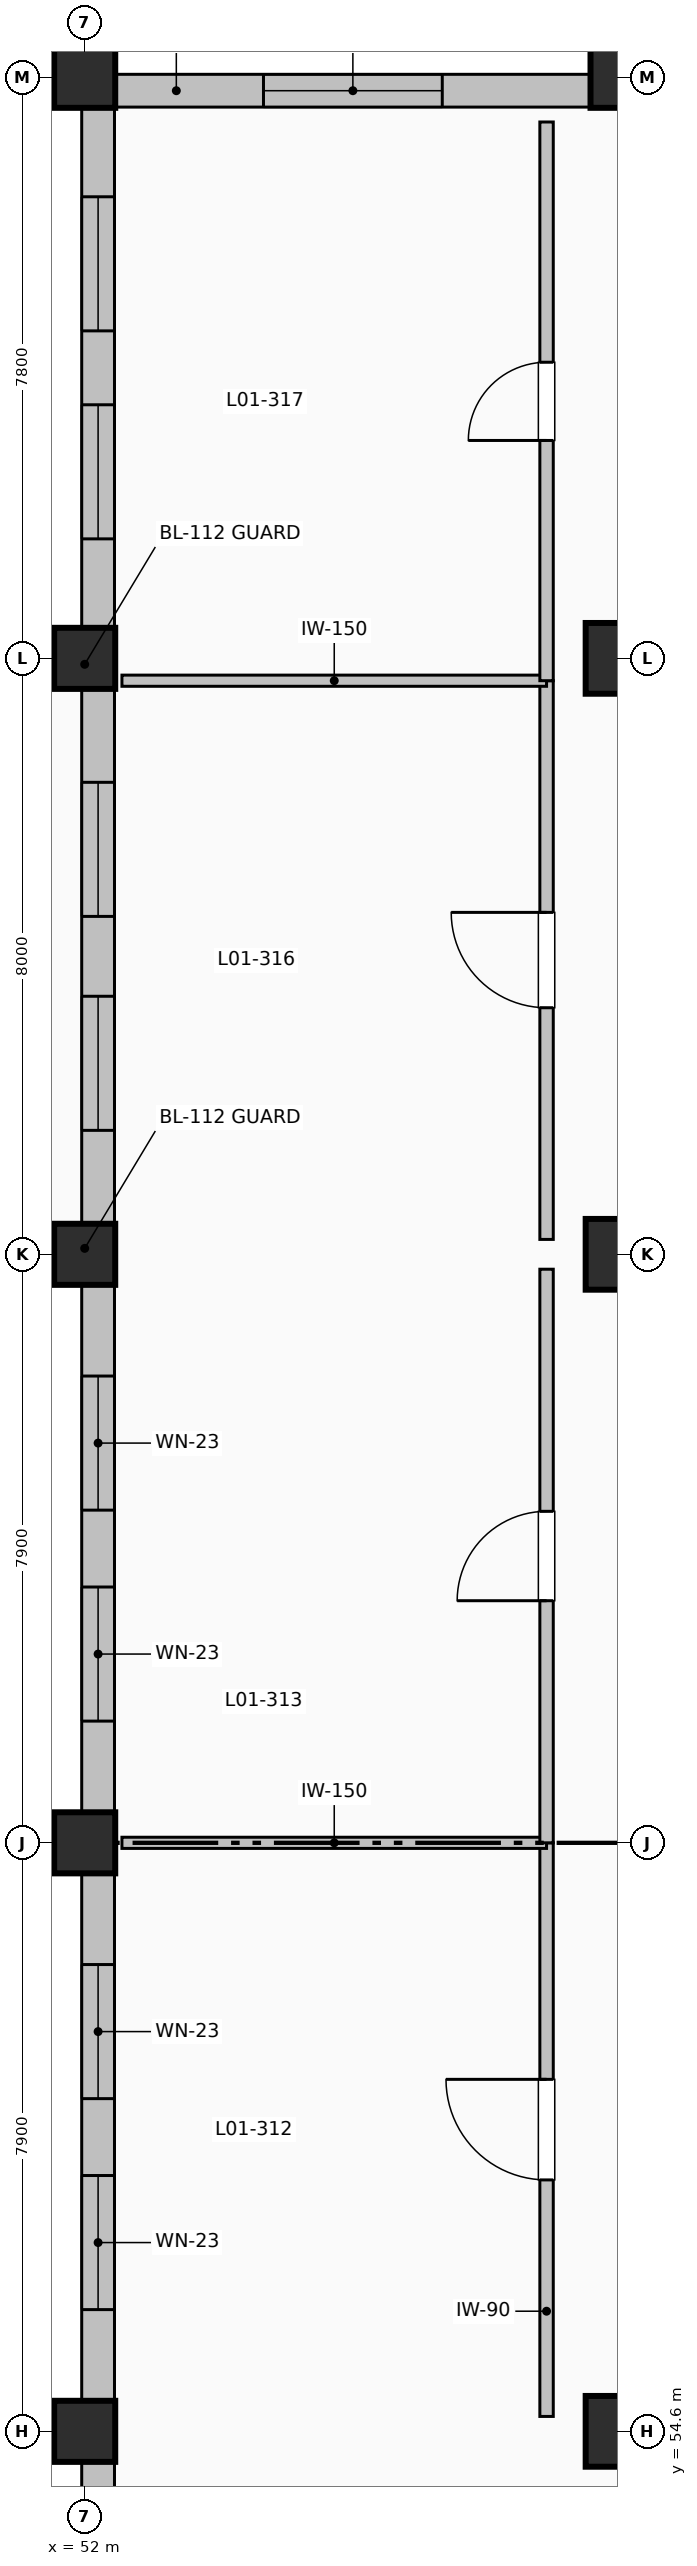
"""IFC4 building model, lengths in metres.
Left out: names, types, materials, properties, quantities, classifications, styles, units other than length and angle.
Written with IfcOpenShell. Run it as: python <this file> out.ifc"""

import sys

from ifc_helpers import new_model, si_unit, direction, frame, frame_2d, origin, origin_2d, place, context, subcontext, project, spatial, rectangle, extrude, element, fill, save


model = new_model("IFC4")
c1 = context("Model", 3, precision=1e-05, world=origin(), true_north=direction((0.0, 1.0)))
c2 = subcontext(c1, "Body", "Model", "MODEL_VIEW")
j1 = project(units=[si_unit("LENGTHUNIT", "METRE"), si_unit("PLANEANGLEUNIT", "RADIAN")], contexts=[c1])
p1 = place(None, origin())
s1 = spatial("IfcSite", under=j1, at=p1, CompositionType="ELEMENT")
p2 = place(p1, origin())
s2 = spatial("IfcBuilding", under=s1, at=p2, CompositionType="ELEMENT")
p3 = place(p2, frame((0.0, 0.0, 5.4)))
s3 = spatial("IfcBuildingStorey", under=s2, at=p3, CompositionType="ELEMENT", Elevation=5.4)
for number, where, z_axis, x_axis in (
    (1, (52.0, 54.6, 0.0), (0.0, 0.0, 1.0), (1.0, 0.0, 0.0)),
    (2, (52.0, 62.5, 0.0), (0.0, 0.0, 1.0), (1.0, 0.0, 0.0)),
    (3, (52.0, 70.4, 0.0), (0.0, 0.0, 1.0), (1.0, 0.0, 0.0)),
    (4, (52.0, 78.4, 0.0), (0.0, 0.0, 1.0), (1.0, 0.0, 0.0)),
    (5, (52.0, 86.2, 0.0), (0.0, 0.0, 1.0), (1.0, 0.0, 0.0)),
):
    element("IfcColumn", number, at=place(p3, frame(where, z_axis=z_axis, x_axis=x_axis)), inside=s3, PredefinedType="COLUMN", context=c2, shape_type="SweptSolid", body=[
        extrude(rectangle(XDim=0.82, YDim=0.82, at=origin_2d()), origin(), (0.0, 0.0, 1.0), 4.8),
    ])
for number, where, z_axis, x_axis in (
    (6, (59.2, 54.6, 0.0), (0.0, 0.0, 1.0), (1.0, 0.0, 0.0)),
    (7, (59.2, 70.4, 0.0), (0.0, 0.0, 1.0), (1.0, 0.0, 0.0)),
    (8, (59.2, 78.4, 0.0), (0.0, 0.0, 1.0), (1.0, 0.0, 0.0)),
):
    element("IfcColumn", number, at=place(p3, frame(where, z_axis=z_axis, x_axis=x_axis)), inside=s3, PredefinedType="COLUMN", context=c2, shape_type="SweptSolid", body=[
        extrude(rectangle(XDim=0.95, YDim=0.95, at=origin_2d()), origin(), (0.0, 0.0, 1.0), 4.8),
    ])
p4 = place(p3, frame((59.2, 86.2, 0.0), z_axis=(0.0, 0.0, 1.0), x_axis=(1.0, 0.0, 0.0)))
e9 = element("IfcColumn", 9, at=p4, inside=s3, PredefinedType="COLUMN", context=c2, shape_type="SweptSolid", body=[
    extrude(rectangle(XDim=0.82, YDim=0.82, at=origin_2d()), origin(), (0.0, 0.0, 1.0), 4.8),
])
p5 = place(p3, frame((52.41, 86.02, 0.0), z_axis=(0.0, 0.0, 1.0), x_axis=(1.0, 0.0, 0.0)))
e10 = element("IfcWall", 10, at=p5, inside=s3, PredefinedType="SOLIDWALL", context=c2, shape_type="SweptSolid", body=[
    extrude(rectangle(XDim=6.38, YDim=0.44, at=frame_2d((3.19, 0.0))), origin(), (0.0, 0.0, 1.0), 3.722),
])
p6 = place(p5, frame((1.99, 0.0, 1.05)))
e11 = element("IfcOpeningElement", 11, at=p6, cuts=e10, PredefinedType="OPENING", context=c2, shape_type="SweptSolid", body=[
    extrude(rectangle(XDim=2.4, YDim=1.25, at=frame_2d((1.2, 0.625))), frame((0.0, 0.23, 0.0), z_axis=(0.0, -1.0, 0.0), x_axis=(1.0, 0.0, 0.0)), (0.0, 0.0, 1.0), 0.46),
])
p7 = place(p3, frame((52.18, 47.01, 0.0), z_axis=(0.0, 0.0, 1.0), x_axis=(0.0, 1.0, 0.0)))
e12 = element("IfcWall", 12, at=p7, inside=s3, PredefinedType="SOLIDWALL", context=c2, shape_type="SweptSolid", body=[
    extrude(rectangle(XDim=7.18, YDim=0.44, at=frame_2d((3.59, 0.0))), origin(), (0.0, 0.0, 1.0), 3.722),
])
p8 = place(p7, frame((1.254, 0.0, 1.05)))
e13 = element("IfcOpeningElement", 13, at=p8, cuts=e12, PredefinedType="OPENING", context=c2, shape_type="SweptSolid", body=[
    extrude(rectangle(XDim=1.8, YDim=1.25, at=frame_2d((0.9, 0.625))), frame((0.0, 0.23, 0.0), z_axis=(0.0, -1.0, 0.0), x_axis=(1.0, 0.0, 0.0)), (0.0, 0.0, 1.0), 0.46),
])
p9 = place(p7, frame((4.126, 0.0, 1.05)))
e14 = element("IfcOpeningElement", 14, at=p9, cuts=e12, PredefinedType="OPENING", context=c2, shape_type="SweptSolid", body=[
    extrude(rectangle(XDim=1.8, YDim=1.25, at=frame_2d((0.9, 0.625))), frame((0.0, 0.23, 0.0), z_axis=(0.0, -1.0, 0.0), x_axis=(1.0, 0.0, 0.0)), (0.0, 0.0, 1.0), 0.46),
])
p10 = place(p3, frame((52.18, 55.01, 0.0), z_axis=(0.0, 0.0, 1.0), x_axis=(0.0, 1.0, 0.0)))
e15 = element("IfcWall", 15, at=p10, inside=s3, PredefinedType="SOLIDWALL", context=c2, shape_type="SweptSolid", body=[
    extrude(rectangle(XDim=7.08, YDim=0.44, at=frame_2d((3.54, 0.0))), origin(), (0.0, 0.0, 1.0), 3.722),
])
p11 = place(p10, frame((1.224, 0.0, 1.05)))
e16 = element("IfcOpeningElement", 16, at=p11, cuts=e15, PredefinedType="OPENING", context=c2, shape_type="SweptSolid", body=[
    extrude(rectangle(XDim=1.8, YDim=1.25, at=frame_2d((0.9, 0.625))), frame((0.0, 0.23, 0.0), z_axis=(0.0, -1.0, 0.0), x_axis=(1.0, 0.0, 0.0)), (0.0, 0.0, 1.0), 0.46),
])
p12 = place(p10, frame((4.056, 0.0, 1.05)))
e17 = element("IfcOpeningElement", 17, at=p12, cuts=e15, PredefinedType="OPENING", context=c2, shape_type="SweptSolid", body=[
    extrude(rectangle(XDim=1.8, YDim=1.25, at=frame_2d((0.9, 0.625))), frame((0.0, 0.23, 0.0), z_axis=(0.0, -1.0, 0.0), x_axis=(1.0, 0.0, 0.0)), (0.0, 0.0, 1.0), 0.46),
])
p13 = place(p3, frame((52.18, 62.91, 0.0), z_axis=(0.0, 0.0, 1.0), x_axis=(0.0, 1.0, 0.0)))
e18 = element("IfcWall", 18, at=p13, inside=s3, PredefinedType="SOLIDWALL", context=c2, shape_type="SweptSolid", body=[
    extrude(rectangle(XDim=7.08, YDim=0.44, at=frame_2d((3.54, 0.0))), origin(), (0.0, 0.0, 1.0), 3.722),
])
p14 = place(p13, frame((1.224, 0.0, 1.05)))
e19 = element("IfcOpeningElement", 19, at=p14, cuts=e18, PredefinedType="OPENING", context=c2, shape_type="SweptSolid", body=[
    extrude(rectangle(XDim=1.8, YDim=1.25, at=frame_2d((0.9, 0.625))), frame((0.0, 0.23, 0.0), z_axis=(0.0, -1.0, 0.0), x_axis=(1.0, 0.0, 0.0)), (0.0, 0.0, 1.0), 0.46),
])
p15 = place(p13, frame((4.056, 0.0, 1.05)))
e20 = element("IfcOpeningElement", 20, at=p15, cuts=e18, PredefinedType="OPENING", context=c2, shape_type="SweptSolid", body=[
    extrude(rectangle(XDim=1.8, YDim=1.25, at=frame_2d((0.9, 0.625))), frame((0.0, 0.23, 0.0), z_axis=(0.0, -1.0, 0.0), x_axis=(1.0, 0.0, 0.0)), (0.0, 0.0, 1.0), 0.46),
])
p16 = place(p3, frame((52.18, 70.81, 0.0), z_axis=(0.0, 0.0, 1.0), x_axis=(0.0, 1.0, 0.0)))
e21 = element("IfcWall", 21, at=p16, inside=s3, PredefinedType="SOLIDWALL", context=c2, shape_type="SweptSolid", body=[
    extrude(rectangle(XDim=7.18, YDim=0.44, at=frame_2d((3.59, 0.0))), origin(), (0.0, 0.0, 1.0), 3.722),
])
p17 = place(p16, frame((1.254, 0.0, 1.05)))
e22 = element("IfcOpeningElement", 22, at=p17, cuts=e21, PredefinedType="OPENING", context=c2, shape_type="SweptSolid", body=[
    extrude(rectangle(XDim=1.8, YDim=1.25, at=frame_2d((0.9, 0.625))), frame((0.0, 0.23, 0.0), z_axis=(0.0, -1.0, 0.0), x_axis=(1.0, 0.0, 0.0)), (0.0, 0.0, 1.0), 0.46),
])
p18 = place(p16, frame((4.126, 0.0, 1.05)))
e23 = element("IfcOpeningElement", 23, at=p18, cuts=e21, PredefinedType="OPENING", context=c2, shape_type="SweptSolid", body=[
    extrude(rectangle(XDim=1.8, YDim=1.25, at=frame_2d((0.9, 0.625))), frame((0.0, 0.23, 0.0), z_axis=(0.0, -1.0, 0.0), x_axis=(1.0, 0.0, 0.0)), (0.0, 0.0, 1.0), 0.46),
])
p19 = place(p3, frame((52.18, 78.81, 0.0), z_axis=(0.0, 0.0, 1.0), x_axis=(0.0, 1.0, 0.0)))
e24 = element("IfcWall", 24, at=p19, inside=s3, PredefinedType="SOLIDWALL", context=c2, shape_type="SweptSolid", body=[
    extrude(rectangle(XDim=6.98, YDim=0.44, at=frame_2d((3.49, 0.0))), origin(), (0.0, 0.0, 1.0), 3.722),
])
p20 = place(p19, frame((1.194, 0.0, 1.05)))
e25 = element("IfcOpeningElement", 25, at=p20, cuts=e24, PredefinedType="OPENING", context=c2, shape_type="SweptSolid", body=[
    extrude(rectangle(XDim=1.8, YDim=1.25, at=frame_2d((0.9, 0.625))), frame((0.0, 0.23, 0.0), z_axis=(0.0, -1.0, 0.0), x_axis=(1.0, 0.0, 0.0)), (0.0, 0.0, 1.0), 0.46),
])
p21 = place(p19, frame((3.986, 0.0, 1.05)))
e26 = element("IfcOpeningElement", 26, at=p21, cuts=e24, PredefinedType="OPENING", context=c2, shape_type="SweptSolid", body=[
    extrude(rectangle(XDim=1.8, YDim=1.25, at=frame_2d((0.9, 0.625))), frame((0.0, 0.23, 0.0), z_axis=(0.0, -1.0, 0.0), x_axis=(1.0, 0.0, 0.0)), (0.0, 0.0, 1.0), 0.46),
])
p22 = place(p3, frame((58.2, 54.8, 0.0), z_axis=(0.0, 0.0, 1.0), x_axis=(0.0, 1.0, 0.0)))
e27 = element("IfcWall", 27, at=p22, inside=s3, PredefinedType="PARTITIONING", context=c2, shape_type="SweptSolid", body=[
    extrude(rectangle(XDim=7.7, YDim=0.18, at=frame_2d((3.85, 0.0))), origin(), (0.0, 0.0, 1.0), 4.472),
])
p23 = place(p22, frame((3.175, 0.0, 0.0)))
e28 = element("IfcOpeningElement", 28, at=p23, cuts=e27, PredefinedType="OPENING", context=c2, shape_type="SweptSolid", body=[
    extrude(rectangle(XDim=1.35, YDim=2.16, at=frame_2d((0.675, 1.08))), frame((0.0, 0.1, 0.0), z_axis=(0.0, -1.0, 0.0), x_axis=(1.0, 0.0, 0.0)), (0.0, 0.0, 1.0), 0.2),
])
p24 = place(p3, frame((52.5, 62.5, 0.0), z_axis=(0.0, 0.0, 1.0), x_axis=(1.0, 0.0, 0.0)))
e29 = element("IfcWall", 29, at=p24, inside=s3, PredefinedType="PARTITIONING", context=c2, shape_type="SweptSolid", body=[
    extrude(rectangle(XDim=5.7, YDim=0.15, at=frame_2d((2.85, 0.0))), origin(), (0.0, 0.0, 1.0), 2.872),
])
p25 = place(p3, frame((58.2, 62.5, 0.0), z_axis=(0.0, 0.0, 1.0), x_axis=(0.0, 1.0, 0.0)))
e30 = element("IfcWall", 30, at=p25, inside=s3, PredefinedType="PARTITIONING", context=c2, shape_type="SweptSolid", body=[
    extrude(rectangle(XDim=7.7, YDim=0.18, at=frame_2d((3.85, 0.0))), origin(), (0.0, 0.0, 1.0), 4.472),
])
p26 = place(p25, frame((3.25, 0.0, 0.0)))
e31 = element("IfcOpeningElement", 31, at=p26, cuts=e30, PredefinedType="OPENING", context=c2, shape_type="SweptSolid", body=[
    extrude(rectangle(XDim=1.2, YDim=2.1, at=frame_2d((0.6, 1.05))), frame((0.0, 0.1, 0.0), z_axis=(0.0, -1.0, 0.0), x_axis=(1.0, 0.0, 0.0)), (0.0, 0.0, 1.0), 0.2),
])
p27 = place(p3, frame((58.2, 70.6, 0.0), z_axis=(0.0, 0.0, 1.0), x_axis=(0.0, 1.0, 0.0)))
e32 = element("IfcWall", 32, at=p27, inside=s3, PredefinedType="PARTITIONING", context=c2, shape_type="SweptSolid", body=[
    extrude(rectangle(XDim=7.5, YDim=0.18, at=frame_2d((3.75, 0.0))), origin(), (0.0, 0.0, 1.0), 4.472),
])
p28 = place(p27, frame((3.11, 0.0, 0.0)))
e33 = element("IfcOpeningElement", 33, at=p28, cuts=e32, PredefinedType="OPENING", context=c2, shape_type="SweptSolid", body=[
    extrude(rectangle(XDim=1.28, YDim=2.14, at=frame_2d((0.64, 1.07))), frame((0.0, 0.1, 0.0), z_axis=(0.0, -1.0, 0.0), x_axis=(1.0, 0.0, 0.0)), (0.0, 0.0, 1.0), 0.2),
])
p29 = place(p3, frame((52.5, 78.1, 0.0), z_axis=(0.0, 0.0, 1.0), x_axis=(1.0, 0.0, 0.0)))
e34 = element("IfcWall", 34, at=p29, inside=s3, PredefinedType="PARTITIONING", context=c2, shape_type="SweptSolid", body=[
    extrude(rectangle(XDim=5.7, YDim=0.15, at=frame_2d((2.85, 0.0))), origin(), (0.0, 0.0, 1.0), 4.472),
])
p30 = place(p3, frame((58.2, 78.1, 0.0), z_axis=(0.0, 0.0, 1.0), x_axis=(0.0, 1.0, 0.0)))
e35 = element("IfcWall", 35, at=p30, inside=s3, PredefinedType="PARTITIONING", context=c2, shape_type="SweptSolid", body=[
    extrude(rectangle(XDim=7.5, YDim=0.18, at=frame_2d((3.75, 0.0))), origin(), (0.0, 0.0, 1.0), 4.472),
])
p31 = place(p30, frame((3.225, 0.0, 0.0)))
e36 = element("IfcOpeningElement", 36, at=p31, cuts=e35, PredefinedType="OPENING", context=c2, shape_type="SweptSolid", body=[
    extrude(rectangle(XDim=1.05, YDim=2.1, at=frame_2d((0.525, 1.05))), frame((0.0, 0.1, 0.0), z_axis=(0.0, -1.0, 0.0), x_axis=(1.0, 0.0, 0.0)), (0.0, 0.0, 1.0), 0.2),
])
p32 = place(p6, origin())
e37 = element("IfcWindow", 37, at=p32, inside=s3, PartitioningType="SINGLE_PANEL", PredefinedType="WINDOW", context=c2, shape_type="SweptSolid", body=[
    extrude(rectangle(XDim=2.4, YDim=1.25, at=frame_2d((1.2, 0.625))), frame((0.0, 0.03, 0.0), z_axis=(0.0, -1.0, 0.0), x_axis=(1.0, 0.0, 0.0)), (0.0, 0.0, 1.0), 0.06),
])
fill(e11, e37)
p33 = place(p11, origin())
e38 = element("IfcWindow", 38, at=p33, inside=s3, PartitioningType="SINGLE_PANEL", PredefinedType="WINDOW", context=c2, shape_type="SweptSolid", body=[
    extrude(rectangle(XDim=1.8, YDim=1.25, at=frame_2d((0.9, 0.625))), frame((0.0, 0.03, 0.0), z_axis=(0.0, -1.0, 0.0), x_axis=(1.0, 0.0, 0.0)), (0.0, 0.0, 1.0), 0.06),
])
fill(e16, e38)
p34 = place(p12, origin())
e39 = element("IfcWindow", 39, at=p34, inside=s3, PartitioningType="SINGLE_PANEL", PredefinedType="WINDOW", context=c2, shape_type="SweptSolid", body=[
    extrude(rectangle(XDim=1.8, YDim=1.25, at=frame_2d((0.9, 0.625))), frame((0.0, 0.03, 0.0), z_axis=(0.0, -1.0, 0.0), x_axis=(1.0, 0.0, 0.0)), (0.0, 0.0, 1.0), 0.06),
])
fill(e17, e39)
p35 = place(p14, origin())
e40 = element("IfcWindow", 40, at=p35, inside=s3, PartitioningType="SINGLE_PANEL", PredefinedType="WINDOW", context=c2, shape_type="SweptSolid", body=[
    extrude(rectangle(XDim=1.8, YDim=1.25, at=frame_2d((0.9, 0.625))), frame((0.0, 0.03, 0.0), z_axis=(0.0, -1.0, 0.0), x_axis=(1.0, 0.0, 0.0)), (0.0, 0.0, 1.0), 0.06),
])
fill(e19, e40)
p36 = place(p15, origin())
e41 = element("IfcWindow", 41, at=p36, inside=s3, PartitioningType="SINGLE_PANEL", PredefinedType="WINDOW", context=c2, shape_type="SweptSolid", body=[
    extrude(rectangle(XDim=1.8, YDim=1.25, at=frame_2d((0.9, 0.625))), frame((0.0, 0.03, 0.0), z_axis=(0.0, -1.0, 0.0), x_axis=(1.0, 0.0, 0.0)), (0.0, 0.0, 1.0), 0.06),
])
fill(e20, e41)
p37 = place(p17, origin())
e42 = element("IfcWindow", 42, at=p37, inside=s3, PartitioningType="SINGLE_PANEL", PredefinedType="WINDOW", context=c2, shape_type="SweptSolid", body=[
    extrude(rectangle(XDim=1.8, YDim=1.25, at=frame_2d((0.9, 0.625))), frame((0.0, 0.03, 0.0), z_axis=(0.0, -1.0, 0.0), x_axis=(1.0, 0.0, 0.0)), (0.0, 0.0, 1.0), 0.06),
])
fill(e22, e42)
p38 = place(p18, origin())
e43 = element("IfcWindow", 43, at=p38, inside=s3, PartitioningType="SINGLE_PANEL", PredefinedType="WINDOW", context=c2, shape_type="SweptSolid", body=[
    extrude(rectangle(XDim=1.8, YDim=1.25, at=frame_2d((0.9, 0.625))), frame((0.0, 0.03, 0.0), z_axis=(0.0, -1.0, 0.0), x_axis=(1.0, 0.0, 0.0)), (0.0, 0.0, 1.0), 0.06),
])
fill(e23, e43)
p39 = place(p20, origin())
e44 = element("IfcWindow", 44, at=p39, inside=s3, PartitioningType="SINGLE_PANEL", PredefinedType="WINDOW", context=c2, shape_type="SweptSolid", body=[
    extrude(rectangle(XDim=1.8, YDim=1.25, at=frame_2d((0.9, 0.625))), frame((0.0, 0.03, 0.0), z_axis=(0.0, -1.0, 0.0), x_axis=(1.0, 0.0, 0.0)), (0.0, 0.0, 1.0), 0.06),
])
fill(e25, e44)
p40 = place(p21, origin())
e45 = element("IfcWindow", 45, at=p40, inside=s3, PartitioningType="SINGLE_PANEL", PredefinedType="WINDOW", context=c2, shape_type="SweptSolid", body=[
    extrude(rectangle(XDim=1.8, YDim=1.25, at=frame_2d((0.9, 0.625))), frame((0.0, 0.03, 0.0), z_axis=(0.0, -1.0, 0.0), x_axis=(1.0, 0.0, 0.0)), (0.0, 0.0, 1.0), 0.06),
])
fill(e26, e45)
p41 = place(p23, origin())
e46 = element("IfcDoor", 46, at=p41, inside=s3, OperationType="SINGLE_SWING_RIGHT", PredefinedType="DOOR", context=c2, shape_type="SweptSolid", body=[
    extrude(rectangle(XDim=1.35, YDim=2.16, at=frame_2d((0.675, 1.08))), frame((0.0, 0.025, 0.0), z_axis=(0.0, -1.0, 0.0), x_axis=(1.0, 0.0, 0.0)), (0.0, 0.0, 1.0), 0.05),
])
fill(e28, e46)
p42 = place(p26, origin())
e47 = element("IfcDoor", 47, at=p42, inside=s3, OperationType="SINGLE_SWING_LEFT", PredefinedType="DOOR", context=c2, shape_type="SweptSolid", body=[
    extrude(rectangle(XDim=1.2, YDim=2.1, at=frame_2d((0.6, 1.05))), frame((0.0, 0.025, 0.0), z_axis=(0.0, -1.0, 0.0), x_axis=(1.0, 0.0, 0.0)), (0.0, 0.0, 1.0), 0.05),
])
fill(e31, e47)
p43 = place(p28, origin())
e48 = element("IfcDoor", 48, at=p43, inside=s3, OperationType="SINGLE_SWING_RIGHT", PredefinedType="DOOR", context=c2, shape_type="SweptSolid", body=[
    extrude(rectangle(XDim=1.28, YDim=2.14, at=frame_2d((0.64, 1.07))), frame((0.0, 0.025, 0.0), z_axis=(0.0, -1.0, 0.0), x_axis=(1.0, 0.0, 0.0)), (0.0, 0.0, 1.0), 0.05),
])
fill(e33, e48)
p44 = place(p31, origin())
e49 = element("IfcDoor", 49, at=p44, inside=s3, OperationType="SINGLE_SWING_LEFT", PredefinedType="DOOR", context=c2, shape_type="SweptSolid", body=[
    extrude(rectangle(XDim=1.05, YDim=2.1, at=frame_2d((0.525, 1.05))), frame((0.0, 0.025, 0.0), z_axis=(0.0, -1.0, 0.0), x_axis=(1.0, 0.0, 0.0)), (0.0, 0.0, 1.0), 0.05),
])
fill(e36, e49)
save(model, sys.argv[1])
